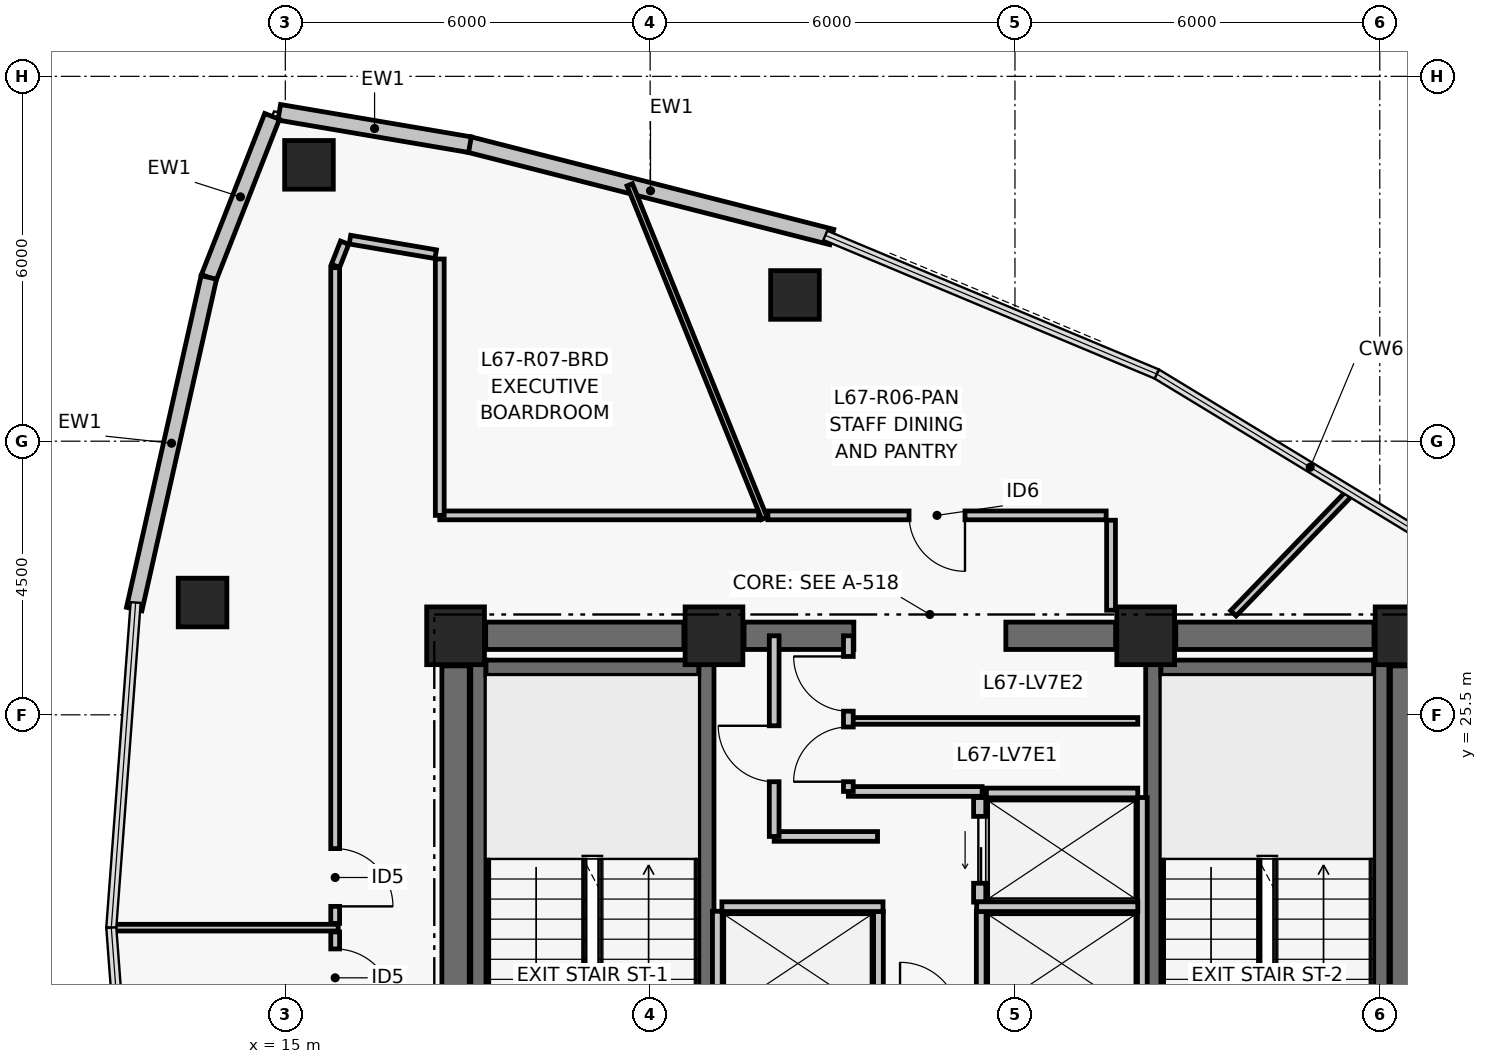
"""IFC4 building model, lengths in metres.
Left out: names, types, materials, properties, quantities, classifications, styles, units other than length and angle.
Written with IfcOpenShell. Run it as: python <this file> out.ifc"""

import sys

from ifc_helpers import new_model, si_unit, direction, frame, frame_2d, origin, origin_2d, place, context, subcontext, project, spatial, rectangle, hollow_rectangle, extrude, element, fill, save


model = new_model("IFC4")
c1 = context("Model", 3, precision=1e-05, world=origin(), true_north=direction((0.0, 1.0)))
c2 = subcontext(c1, "Body", "Model", "MODEL_VIEW")
j1 = project(units=[si_unit("LENGTHUNIT", "METRE"), si_unit("PLANEANGLEUNIT", "RADIAN")], contexts=[c1])
p1 = place(None, origin())
s1 = spatial("IfcSite", under=j1, at=p1, CompositionType="ELEMENT")
p2 = place(p1, origin())
s2 = spatial("IfcBuilding", under=s1, at=p2, CompositionType="ELEMENT")
p3 = place(p2, frame((0.0, 0.0, 265.74)))
s3 = spatial("IfcBuildingStorey", under=s2, at=p3, CompositionType="ELEMENT", Elevation=265.74)
for number, where, z_axis, x_axis in (
    (1, (17.8, 26.8, 0.0), (0.0, 0.0, 1.0), (1.0, 0.0, 0.0)),
    (2, (22.05, 26.8, 0.0), (0.0, 0.0, 1.0), (1.0, 0.0, 0.0)),
    (3, (29.15, 26.8, 0.0), (0.0, 0.0, 1.0), (1.0, 0.0, 0.0)),
    (4, (33.4, 26.8, 0.0), (0.0, 0.0, 1.0), (1.0, 0.0, 0.0)),
):
    element("IfcColumn", number, at=place(p3, frame(where, z_axis=z_axis, x_axis=x_axis)), inside=s3, PredefinedType="COLUMN", context=c2, shape_type="SweptSolid", body=[
        extrude(rectangle(XDim=0.95, YDim=0.95, at=origin_2d()), origin(), (0.0, 0.0, 1.0), 3.72),
    ])
p4 = place(p3, frame((18.295, 26.8, 0.0), z_axis=(0.0, 0.0, 1.0), x_axis=(1.0, 0.0, 0.0)))
e5 = element("IfcWall", 5, at=p4, inside=s3, PredefinedType="SHEAR", context=c2, shape_type="SweptSolid", body=[
    extrude(rectangle(XDim=3.26, YDim=0.45, at=frame_2d((1.63, 0.0))), origin(), (0.0, 0.0, 1.0), 3.5),
])
p5 = place(p3, frame((22.545, 26.8, 0.0), z_axis=(0.0, 0.0, 1.0), x_axis=(1.0, 0.0, 0.0)))
e6 = element("IfcWall", 6, at=p5, inside=s3, PredefinedType="SHEAR", context=c2, shape_type="SweptSolid", body=[
    extrude(rectangle(XDim=1.805, YDim=0.45, at=frame_2d((0.903, 0.0))), origin(), (0.0, 0.0, 1.0), 3.5),
])
p6 = place(p3, frame((26.85, 26.8, 0.0), z_axis=(0.0, 0.0, 1.0), x_axis=(1.0, 0.0, 0.0)))
e7 = element("IfcWall", 7, at=p6, inside=s3, PredefinedType="SHEAR", context=c2, shape_type="SweptSolid", body=[
    extrude(rectangle(XDim=1.805, YDim=0.45, at=frame_2d((0.902, 0.0))), origin(), (0.0, 0.0, 1.0), 3.5),
])
p7 = place(p3, frame((29.645, 26.8, 0.0), z_axis=(0.0, 0.0, 1.0), x_axis=(1.0, 0.0, 0.0)))
e8 = element("IfcWall", 8, at=p7, inside=s3, PredefinedType="SHEAR", context=c2, shape_type="SweptSolid", body=[
    extrude(rectangle(XDim=3.26, YDim=0.45, at=frame_2d((1.63, 0.0))), origin(), (0.0, 0.0, 1.0), 3.5),
])
for number, where, z_axis, x_axis in (
    (9, (17.8, 17.695, 0.0), (0.0, 0.0, 1.0), (0.0, 1.0, 0.0)),
    (10, (33.4, 17.695, 0.0), (0.0, 0.0, 1.0), (0.0, 1.0, 0.0)),
):
    element("IfcWall", number, at=place(p3, frame(where, z_axis=z_axis, x_axis=x_axis)), inside=s3, PredefinedType="SHEAR", context=c2, shape_type="SweptSolid", body=[
        extrude(rectangle(XDim=8.61, YDim=0.45, at=frame_2d((4.305, 0.0))), origin(), (0.0, 0.0, 1.0), 3.5),
    ])
p8 = place(p3, frame((18.175, 17.6, 0.0), z_axis=(0.0, 0.0, 1.0), x_axis=(0.0, 1.0, 0.0)))
e11 = element("IfcWall", 11, at=p8, inside=s3, PredefinedType="SHEAR", context=c2, shape_type="SweptSolid", body=[
    extrude(rectangle(XDim=8.8, YDim=0.25, at=frame_2d((4.4, 0.0))), origin(), (0.0, 0.0, 1.0), 3.5),
])
p9 = place(p3, frame((21.925, 17.6, 0.0), z_axis=(0.0, 0.0, 1.0), x_axis=(0.0, 1.0, 0.0)))
e12 = element("IfcWall", 12, at=p9, inside=s3, PredefinedType="SHEAR", context=c2, shape_type="SweptSolid", body=[
    extrude(rectangle(XDim=8.8, YDim=0.25, at=frame_2d((4.4, 0.0))), origin(), (0.0, 0.0, 1.0), 3.5),
])
p10 = place(p9, frame((0.35, 0.0, 0.0)))
e13 = element("IfcOpeningElement", 13, at=p10, cuts=e12, PredefinedType="OPENING", context=c2, shape_type="SweptSolid", body=[
    extrude(rectangle(XDim=1.05, YDim=2.08, at=frame_2d((0.525, 1.04))), frame((0.0, 0.135, 0.0), z_axis=(0.0, -1.0, 0.0), x_axis=(1.0, 0.0, 0.0)), (0.0, 0.0, 1.0), 0.27),
])
p11 = place(p3, frame((18.3, 26.275, 0.0), z_axis=(0.0, 0.0, 1.0), x_axis=(1.0, 0.0, 0.0)))
e14 = element("IfcWall", 14, at=p11, inside=s3, PredefinedType="SHEAR", context=c2, shape_type="SweptSolid", body=[
    extrude(rectangle(XDim=3.5, YDim=0.25, at=frame_2d((1.75, 0.0))), origin(), (0.0, 0.0, 1.0), 3.5),
])
p12 = place(p3, frame((29.275, 17.6, 0.0), z_axis=(0.0, 0.0, 1.0), x_axis=(0.0, 1.0, 0.0)))
e15 = element("IfcWall", 15, at=p12, inside=s3, PredefinedType="SHEAR", context=c2, shape_type="SweptSolid", body=[
    extrude(rectangle(XDim=8.8, YDim=0.25, at=frame_2d((4.4, 0.0))), origin(), (0.0, 0.0, 1.0), 3.5),
])
p13 = place(p12, frame((0.35, 0.0, 0.0)))
e16 = element("IfcOpeningElement", 16, at=p13, cuts=e15, PredefinedType="OPENING", context=c2, shape_type="SweptSolid", body=[
    extrude(rectangle(XDim=1.05, YDim=2.08, at=frame_2d((0.525, 1.04))), frame((0.0, 0.135, 0.0), z_axis=(0.0, -1.0, 0.0), x_axis=(1.0, 0.0, 0.0)), (0.0, 0.0, 1.0), 0.27),
])
p14 = place(p3, frame((33.025, 17.6, 0.0), z_axis=(0.0, 0.0, 1.0), x_axis=(0.0, 1.0, 0.0)))
e17 = element("IfcWall", 17, at=p14, inside=s3, PredefinedType="SHEAR", context=c2, shape_type="SweptSolid", body=[
    extrude(rectangle(XDim=8.8, YDim=0.25, at=frame_2d((4.4, 0.0))), origin(), (0.0, 0.0, 1.0), 3.5),
])
p15 = place(p3, frame((29.4, 26.275, 0.0), z_axis=(0.0, 0.0, 1.0), x_axis=(1.0, 0.0, 0.0)))
e18 = element("IfcWall", 18, at=p15, inside=s3, PredefinedType="SHEAR", context=c2, shape_type="SweptSolid", body=[
    extrude(rectangle(XDim=3.5, YDim=0.25, at=frame_2d((1.75, 0.0))), origin(), (0.0, 0.0, 1.0), 3.5),
])
for number, where, z_axis, x_axis in (
    (19, (23.382, 32.405, 0.0), (0.0, 0.0, 1.0), (1.0, 0.0, 0.0)),
    (20, (15.389, 34.545, 0.0), (0.0, 0.0, 1.0), (1.0, 0.0, 0.0)),
    (21, (13.639, 27.347, 0.0), (0.0, 0.0, 1.0), (1.0, 0.0, 0.0)),
):
    element("IfcColumn", number, at=place(p3, frame(where, z_axis=z_axis, x_axis=x_axis)), inside=s3, PredefinedType="COLUMN", context=c2, shape_type="SweptSolid", body=[
        extrude(hollow_rectangle(XDim=0.8, YDim=0.8, WallThickness=0.035, at=origin_2d()), origin(), (0.0, 0.0, 1.0), 3.72),
    ])
p16 = place(p3, frame((18.024, 34.879, 0.0), z_axis=(0.0, 0.0, 1.0), x_axis=(0.968988278672, -0.247106689096, 0.0)))
e22 = element("IfcWall", 22, at=p16, inside=s3, PredefinedType="PARTITIONING", context=c2, shape_type="SweptSolid", body=[
    extrude(rectangle(XDim=6.154, YDim=0.26, at=frame_2d((3.077, 0.0))), origin(), (0.0, 0.0, 1.0), 3.5),
])
p17 = place(p3, frame((14.9, 35.409, 0.0), z_axis=(0.0, 0.0, 1.0), x_axis=(0.985889432766, -0.167397808709, 0.0)))
e23 = element("IfcWall", 23, at=p17, inside=s3, PredefinedType="PARTITIONING", context=c2, shape_type="SweptSolid", body=[
    extrude(rectangle(XDim=3.181, YDim=0.26, at=frame_2d((1.59, 0.0))), origin(), (0.0, 0.0, 1.0), 3.5),
])
p18 = place(p3, frame((13.742, 32.693, 0.0), z_axis=(0.0, 0.0, 1.0), x_axis=(0.36559927932, 0.930772349697, 0.0)))
e24 = element("IfcWall", 24, at=p18, inside=s3, PredefinedType="PARTITIONING", context=c2, shape_type="SweptSolid", body=[
    extrude(rectangle(XDim=2.845, YDim=0.26, at=frame_2d((1.423, 0.0))), origin(), (0.0, 0.0, 1.0), 3.5),
])
p19 = place(p3, frame((12.515, 27.24, 0.0), z_axis=(0.0, 0.0, 1.0), x_axis=(0.219500763731, 0.97561232809, 0.0)))
e25 = element("IfcWall", 25, at=p19, inside=s3, PredefinedType="PARTITIONING", context=c2, shape_type="SweptSolid", body=[
    extrude(rectangle(XDim=5.59, YDim=0.26, at=frame_2d((2.795, 0.0))), origin(), (0.0, 0.0, 1.0), 3.5),
])
p20 = place(p3, frame((26.42, 22.42, 0.0), z_axis=(0.0, 0.0, 1.0), x_axis=(0.0, 1.0, 0.0)))
e26 = element("IfcWall", 26, at=p20, inside=s3, PredefinedType="PARTITIONING", context=c2, shape_type="SweptSolid", body=[
    extrude(rectangle(XDim=1.72, YDim=0.2, at=frame_2d((0.86, 0.0))), origin(), (0.0, 0.0, 1.0), 3.5),
])
p21 = place(p20, frame((0.31, 0.0, 0.0)))
e27 = element("IfcOpeningElement", 27, at=p21, cuts=e26, PredefinedType="OPENING", context=c2, shape_type="SweptSolid", body=[
    extrude(rectangle(XDim=1.1, YDim=2.08, at=frame_2d((0.55, 1.04))), frame((0.0, 0.11, 0.0), z_axis=(0.0, -1.0, 0.0), x_axis=(1.0, 0.0, 0.0)), (0.0, 0.0, 1.0), 0.22),
])
for number, where, z_axis, x_axis in (
    (28, (22.105, 20.56, 0.0), (0.0, 0.0, 1.0), (0.0, 1.0, 0.0)),
    (29, (24.755, 20.56, 0.0), (0.0, 0.0, 1.0), (0.0, 1.0, 0.0)),
):
    element("IfcWall", number, at=place(p3, frame(where, z_axis=z_axis, x_axis=x_axis)), inside=s3, PredefinedType="PARTITIONING", context=c2, shape_type="SweptSolid", body=[
        extrude(rectangle(XDim=1.71, YDim=0.16, at=frame_2d((0.855, 0.0))), origin(), (0.0, 0.0, 1.0), 3.5),
    ])
p22 = place(p3, frame((22.18, 22.345, 0.0), z_axis=(0.0, 0.0, 1.0), x_axis=(1.0, 0.0, 0.0)))
e30 = element("IfcWall", 30, at=p22, inside=s3, PredefinedType="PARTITIONING", context=c2, shape_type="SweptSolid", body=[
    extrude(rectangle(XDim=2.65, YDim=0.16, at=frame_2d((1.325, 0.0))), origin(), (0.0, 0.0, 1.0), 3.5),
])
p23 = place(p3, frame((29.095, 20.56, 0.0), z_axis=(0.0, 0.0, 1.0), x_axis=(0.0, 1.0, 0.0)))
e31 = element("IfcWall", 31, at=p23, inside=s3, PredefinedType="PARTITIONING", context=c2, shape_type="SweptSolid", body=[
    extrude(rectangle(XDim=3.58, YDim=0.16, at=frame_2d((1.79, 0.0))), origin(), (0.0, 0.0, 1.0), 3.5),
])
p24 = place(p3, frame((26.445, 20.56, 0.0), z_axis=(0.0, 0.0, 1.0), x_axis=(0.0, 1.0, 0.0)))
e32 = element("IfcWall", 32, at=p24, inside=s3, PredefinedType="PARTITIONING", context=c2, shape_type="SweptSolid", body=[
    extrude(rectangle(XDim=1.71, YDim=0.16, at=frame_2d((0.855, 0.0))), origin(), (0.0, 0.0, 1.0), 3.5),
])
p25 = place(p3, frame((26.37, 22.345, 0.0), z_axis=(0.0, 0.0, 1.0), x_axis=(1.0, 0.0, 0.0)))
e33 = element("IfcWall", 33, at=p25, inside=s3, PredefinedType="PARTITIONING", context=c2, shape_type="SweptSolid", body=[
    extrude(rectangle(XDim=2.65, YDim=0.16, at=frame_2d((1.325, 0.0))), origin(), (0.0, 0.0, 1.0), 3.5),
])
p26 = place(p3, frame((26.53, 24.215, 0.0), z_axis=(0.0, 0.0, 1.0), x_axis=(1.0, 0.0, 0.0)))
e34 = element("IfcWall", 34, at=p26, inside=s3, PredefinedType="PARTITIONING", context=c2, shape_type="SweptSolid", body=[
    extrude(rectangle(XDim=2.49, YDim=0.16, at=frame_2d((1.245, 0.0))), origin(), (0.0, 0.0, 1.0), 3.5),
])
p27 = place(p3, frame((23.04, 23.5, 0.0), z_axis=(0.0, 0.0, 1.0), x_axis=(1.0, 0.0, 0.0)))
e35 = element("IfcWall", 35, at=p27, inside=s3, PredefinedType="PARTITIONING", context=c2, shape_type="SweptSolid", body=[
    extrude(rectangle(XDim=1.7, YDim=0.16, at=frame_2d((0.85, 0.0))), origin(), (0.0, 0.0, 1.0), 3.5),
])
p28 = place(p3, frame((23.04, 23.5, 0.0), z_axis=(0.0, 0.0, 1.0), x_axis=(0.0, 1.0, 0.0)))
e36 = element("IfcWall", 36, at=p28, inside=s3, PredefinedType="PARTITIONING", context=c2, shape_type="SweptSolid", body=[
    extrude(rectangle(XDim=3.3, YDim=0.16, at=frame_2d((1.65, 0.0))), origin(), (0.0, 0.0, 1.0), 2.63),
])
p29 = place(p28, frame((0.9, 0.0, 0.0)))
e37 = element("IfcOpeningElement", 37, at=p29, cuts=e36, PredefinedType="OPENING", context=c2, shape_type="SweptSolid", body=[
    extrude(rectangle(XDim=0.92, YDim=2.05, at=frame_2d((0.46, 1.025))), frame((0.0, 0.09, 0.0), z_axis=(0.0, -1.0, 0.0), x_axis=(1.0, 0.0, 0.0)), (0.0, 0.0, 1.0), 0.18),
])
p30 = place(p3, frame((24.26, 24.24, 0.0), z_axis=(0.0, 0.0, 1.0), x_axis=(1.0, 0.0, 0.0)))
e38 = element("IfcWall", 38, at=p30, inside=s3, PredefinedType="PARTITIONING", context=c2, shape_type="SweptSolid", body=[
    extrude(rectangle(XDim=2.2, YDim=0.16, at=frame_2d((1.1, 0.0))), origin(), (0.0, 0.0, 1.0), 3.5),
])
p31 = place(p3, frame((24.26, 25.4, 0.0), z_axis=(0.0, 0.0, 1.0), x_axis=(1.0, 0.0, 0.0)))
e39 = element("IfcWall", 39, at=p31, inside=s3, PredefinedType="PARTITIONING", context=c2, shape_type="SweptSolid", body=[
    extrude(rectangle(XDim=4.76, YDim=0.11, at=frame_2d((2.38, 0.0))), origin(), (0.0, 0.0, 1.0), 3.5),
])
p32 = place(p3, frame((24.26, 24.24, 0.0), z_axis=(0.0, 0.0, 1.0), x_axis=(0.0, 1.0, 0.0)))
e40 = element("IfcWall", 40, at=p32, inside=s3, PredefinedType="PARTITIONING", context=c2, shape_type="SweptSolid", body=[
    extrude(rectangle(XDim=2.56, YDim=0.16, at=frame_2d((1.28, 0.0))), origin(), (0.0, 0.0, 1.0), 2.63),
])
p33 = place(p32, frame((0.16, 0.0, 0.0)))
e41 = element("IfcOpeningElement", 41, at=p33, cuts=e40, PredefinedType="OPENING", context=c2, shape_type="SweptSolid", body=[
    extrude(rectangle(XDim=0.9, YDim=2.02, at=frame_2d((0.45, 1.01))), frame((0.0, 0.09, 0.0), z_axis=(0.0, -1.0, 0.0), x_axis=(1.0, 0.0, 0.0)), (0.0, 0.0, 1.0), 0.18),
])
p34 = place(p32, frame((1.32, 0.0, 0.0)))
e42 = element("IfcOpeningElement", 42, at=p34, cuts=e40, PredefinedType="OPENING", context=c2, shape_type="SweptSolid", body=[
    extrude(rectangle(XDim=0.9, YDim=2.02, at=frame_2d((0.45, 1.01))), frame((0.0, 0.09, 0.0), z_axis=(0.0, -1.0, 0.0), x_axis=(1.0, 0.0, 0.0)), (0.0, 0.0, 1.0), 0.18),
])
p35 = place(p3, frame((15.82, 21.93, 0.0), z_axis=(0.0, 0.0, 1.0), x_axis=(0.0, -1.0, 0.0)))
e43 = element("IfcWall", 43, at=p35, inside=s3, PredefinedType="PARTITIONING", context=c2, shape_type="SweptSolid", body=[
    extrude(rectangle(XDim=6.951, YDim=0.145, at=frame_2d((3.475, 0.0))), origin(), (0.0, 0.0, 1.0), 2.78),
])
p36 = place(p35, frame((0.28, 0.0, 0.0)))
e44 = element("IfcOpeningElement", 44, at=p36, cuts=e43, PredefinedType="OPENING", context=c2, shape_type="SweptSolid", body=[
    extrude(rectangle(XDim=0.95, YDim=2.06, at=frame_2d((0.475, 1.03))), frame((0.0, 0.083, 0.0), z_axis=(0.0, -1.0, 0.0), x_axis=(1.0, 0.0, 0.0)), (0.0, 0.0, 1.0), 0.165),
])
p37 = place(p3, frame((28.58, 27.22, 0.0), z_axis=(0.0, 0.0, 1.0), x_axis=(0.0, 1.0, 0.0)))
e45 = element("IfcWall", 45, at=p37, inside=s3, PredefinedType="PARTITIONING", context=c2, shape_type="SweptSolid", body=[
    extrude(rectangle(XDim=1.48, YDim=0.145, at=frame_2d((0.74, 0.0))), origin(), (0.0, 0.0, 1.0), 2.63),
])
p38 = place(p3, frame((28.5, 28.78, 0.0), z_axis=(0.0, 0.0, 1.0), x_axis=(-1.0, 0.0, 0.0)))
e46 = element("IfcWall", 46, at=p38, inside=s3, PredefinedType="PARTITIONING", context=c2, shape_type="SweptSolid", body=[
    extrude(rectangle(XDim=5.564, YDim=0.145, at=frame_2d((2.782, 0.0))), origin(), (0.0, 0.0, 1.0), 3.5),
])
p39 = place(p38, frame((2.322, 0.0, 0.0)))
e47 = element("IfcOpeningElement", 47, at=p39, cuts=e46, PredefinedType="OPENING", context=c2, shape_type="SweptSolid", body=[
    extrude(rectangle(XDim=0.92, YDim=2.05, at=frame_2d((0.46, 1.025))), frame((0.0, 0.083, 0.0), z_axis=(0.0, -1.0, 0.0), x_axis=(1.0, 0.0, 0.0)), (0.0, 0.0, 1.0), 0.165),
])
p40 = place(p3, frame((22.785, 28.78, 0.0), z_axis=(0.0, 0.0, 1.0), x_axis=(-1.0, 0.0, 0.0)))
e48 = element("IfcWall", 48, at=p40, inside=s3, PredefinedType="PARTITIONING", context=c2, shape_type="SweptSolid", body=[
    extrude(rectangle(XDim=5.245, YDim=0.145, at=frame_2d((2.623, 0.0))), origin(), (0.0, 0.0, 1.0), 2.78),
])
p41 = place(p3, frame((17.54, 28.78, 0.0), z_axis=(0.0, 0.0, 1.0), x_axis=(0.0, 1.0, 0.0)))
e49 = element("IfcWall", 49, at=p41, inside=s3, PredefinedType="PARTITIONING", context=c2, shape_type="SweptSolid", body=[
    extrude(rectangle(XDim=4.216, YDim=0.145, at=frame_2d((2.108, 0.0))), origin(), (0.0, 0.0, 1.0), 3.13),
])
p42 = place(p3, frame((17.473, 33.075, 0.0), z_axis=(0.0, 0.0, 1.0), x_axis=(-0.985881780308, 0.167442871621, 0.0)))
e50 = element("IfcWall", 50, at=p42, inside=s3, PredefinedType="PARTITIONING", context=c2, shape_type="SweptSolid", body=[
    extrude(rectangle(XDim=1.43, YDim=0.145, at=frame_2d((0.715, 0.0))), origin(), (0.0, 0.0, 1.0), 3.13),
])
p43 = place(p3, frame((15.975, 33.265, 0.0), z_axis=(0.0, 0.0, 1.0), x_axis=(-0.365633948196, -0.930758731319, 0.0)))
e51 = element("IfcWall", 51, at=p43, inside=s3, PredefinedType="PARTITIONING", context=c2, shape_type="SweptSolid", body=[
    extrude(rectangle(XDim=0.41, YDim=0.145, at=frame_2d((0.205, 0.0))), origin(), (0.0, 0.0, 1.0), 2.78),
])
p44 = place(p3, frame((15.82, 32.854, 0.0), z_axis=(0.0, 0.0, 1.0), x_axis=(0.0, -1.0, 0.0)))
e52 = element("IfcWall", 52, at=p44, inside=s3, PredefinedType="PARTITIONING", context=c2, shape_type="SweptSolid", body=[
    extrude(rectangle(XDim=10.784, YDim=0.145, at=frame_2d((5.392, 0.0))), origin(), (0.0, 0.0, 1.0), 2.78),
])
p45 = place(p44, frame((9.554, 0.0, 0.0)))
e53 = element("IfcOpeningElement", 53, at=p45, cuts=e52, PredefinedType="OPENING", context=c2, shape_type="SweptSolid", body=[
    extrude(rectangle(XDim=0.95, YDim=2.06, at=frame_2d((0.475, 1.03))), frame((0.0, 0.083, 0.0), z_axis=(0.0, -1.0, 0.0), x_axis=(1.0, 0.0, 0.0)), (0.0, 0.0, 1.0), 0.165),
])
p46 = place(p3, frame((30.593, 27.17, 0.0), z_axis=(0.0, 0.0, 1.0), x_axis=(0.694647663232, 0.719350140033, 0.0)))
e54 = element("IfcWall", 54, at=p46, inside=s3, PredefinedType="PARTITIONING", context=c2, shape_type="SweptSolid", body=[
    extrude(rectangle(XDim=2.787, YDim=0.125, at=frame_2d((1.394, 0.0))), origin(), (0.0, 0.0, 1.0), 2.63),
])
p47 = place(p3, frame((22.881, 28.73, 0.0), z_axis=(0.0, 0.0, 1.0), x_axis=(-0.374589946081, 0.927190580353, 0.0)))
e55 = element("IfcWall", 55, at=p47, inside=s3, PredefinedType="PARTITIONING", context=c2, shape_type="SweptSolid", body=[
    extrude(rectangle(XDim=5.917, YDim=0.095, at=frame_2d((2.958, 0.0))), origin(), (0.0, 0.0, 1.0), 2.78),
])
p48 = place(p3, frame((15.87, 22.0, 0.0), z_axis=(0.0, 0.0, 1.0), x_axis=(-1.0, 0.0, 0.0)))
e56 = element("IfcWall", 56, at=p48, inside=s3, PredefinedType="PARTITIONING", context=c2, shape_type="SweptSolid", body=[
    extrude(rectangle(XDim=3.742, YDim=0.11, at=frame_2d((1.871, 0.0))), origin(), (0.0, 0.0, 1.0), 2.98),
])
p49 = place(p21, origin())
e57 = element("IfcDoor", 57, at=p49, inside=s3, OperationType="DOUBLE_DOOR_SLIDING", PredefinedType="DOOR", context=c2, shape_type="SweptSolid", body=[
    extrude(rectangle(XDim=1.1, YDim=2.08, at=frame_2d((0.55, 1.04))), frame((0.0, 0.025, 0.0), z_axis=(0.0, -1.0, 0.0), x_axis=(1.0, 0.0, 0.0)), (0.0, 0.0, 1.0), 0.05),
])
fill(e27, e57)
p50 = place(p29, origin())
e58 = element("IfcDoor", 58, at=p50, inside=s3, OperationType="SINGLE_SWING_RIGHT", PredefinedType="DOOR", context=c2, shape_type="SweptSolid", body=[
    extrude(rectangle(XDim=0.92, YDim=2.05, at=frame_2d((0.46, 1.025))), frame((0.0, 0.025, 0.0), z_axis=(0.0, -1.0, 0.0), x_axis=(1.0, 0.0, 0.0)), (0.0, 0.0, 1.0), 0.05),
])
fill(e37, e58)
p51 = place(p33, origin())
e59 = element("IfcDoor", 59, at=p51, inside=s3, OperationType="SINGLE_SWING_LEFT", PredefinedType="DOOR", context=c2, shape_type="SweptSolid", body=[
    extrude(rectangle(XDim=0.9, YDim=2.02, at=frame_2d((0.45, 1.01))), frame((0.0, 0.025, 0.0), z_axis=(0.0, -1.0, 0.0), x_axis=(1.0, 0.0, 0.0)), (0.0, 0.0, 1.0), 0.05),
])
fill(e41, e59)
p52 = place(p34, origin())
e60 = element("IfcDoor", 60, at=p52, inside=s3, OperationType="SINGLE_SWING_RIGHT", PredefinedType="DOOR", context=c2, shape_type="SweptSolid", body=[
    extrude(rectangle(XDim=0.9, YDim=2.02, at=frame_2d((0.45, 1.01))), frame((0.0, 0.025, 0.0), z_axis=(0.0, -1.0, 0.0), x_axis=(1.0, 0.0, 0.0)), (0.0, 0.0, 1.0), 0.05),
])
fill(e42, e60)
p53 = place(p36, origin())
e61 = element("IfcDoor", 61, at=p53, inside=s3, OperationType="SINGLE_SWING_RIGHT", PredefinedType="DOOR", context=c2, shape_type="SweptSolid", body=[
    extrude(rectangle(XDim=0.95, YDim=2.06, at=frame_2d((0.475, 1.03))), frame((0.0, 0.025, 0.0), z_axis=(0.0, -1.0, 0.0), x_axis=(1.0, 0.0, 0.0)), (0.0, 0.0, 1.0), 0.05),
])
fill(e44, e61)
p54 = place(p39, origin())
e62 = element("IfcDoor", 62, at=p54, inside=s3, OperationType="SINGLE_SWING_LEFT", PredefinedType="DOOR", context=c2, shape_type="SweptSolid", body=[
    extrude(rectangle(XDim=0.92, YDim=2.05, at=frame_2d((0.46, 1.025))), frame((0.0, 0.025, 0.0), z_axis=(0.0, -1.0, 0.0), x_axis=(1.0, 0.0, 0.0)), (0.0, 0.0, 1.0), 0.05),
])
fill(e47, e62)
p55 = place(p45, origin())
e63 = element("IfcDoor", 63, at=p55, inside=s3, OperationType="SINGLE_SWING_RIGHT", PredefinedType="DOOR", context=c2, shape_type="SweptSolid", body=[
    extrude(rectangle(XDim=0.95, YDim=2.06, at=frame_2d((0.475, 1.03))), frame((0.0, 0.025, 0.0), z_axis=(0.0, -1.0, 0.0), x_axis=(1.0, 0.0, 0.0)), (0.0, 0.0, 1.0), 0.05),
])
fill(e53, e63)
save(model, sys.argv[1])
